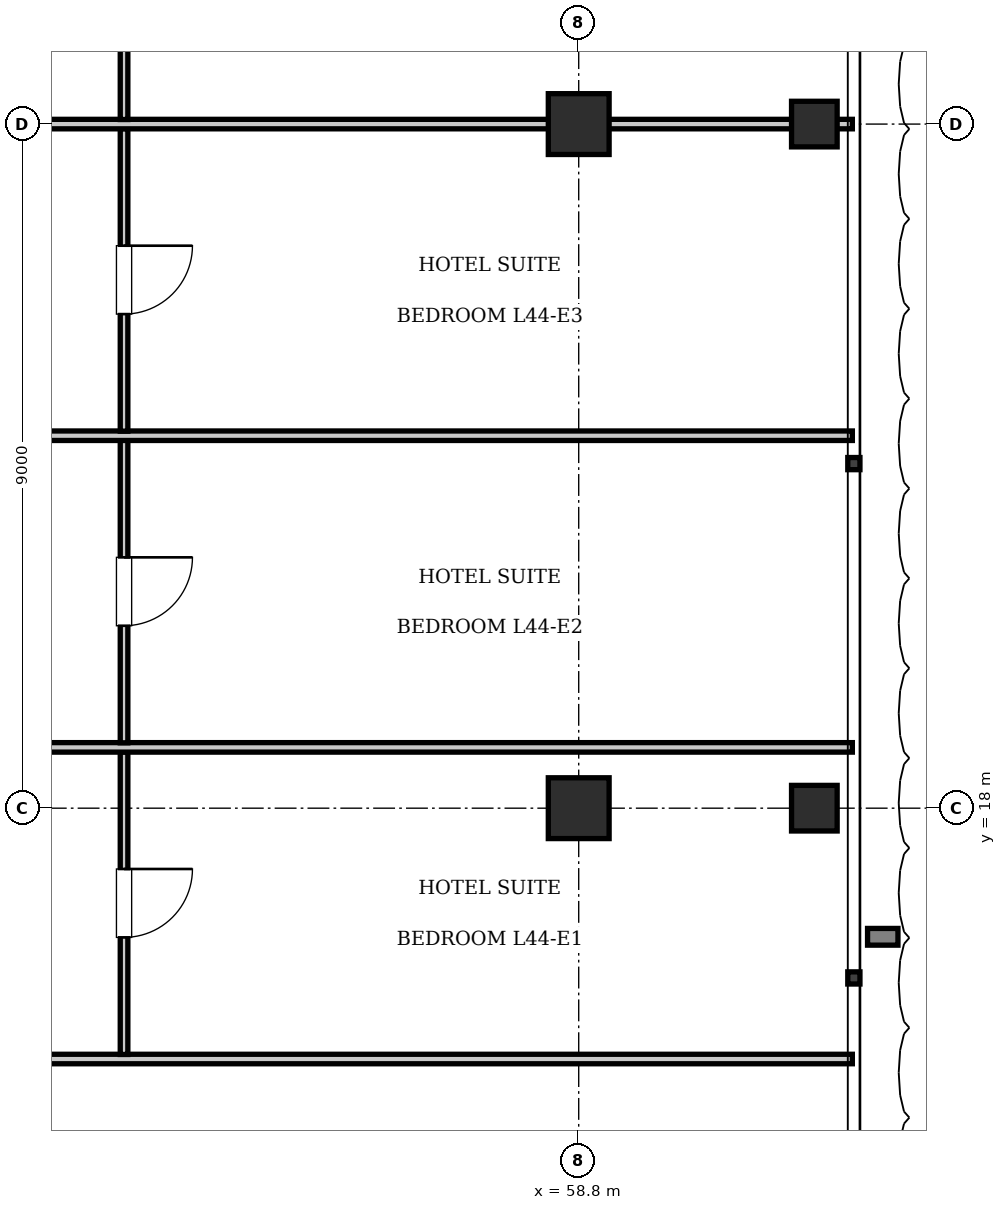
"""IFC4 building model, lengths in metres.
Left out: names, types, materials, properties, quantities, classifications, styles, units other than length and angle.
Written with IfcOpenShell. Run it as: python <this file> out.ifc"""

import sys

from ifc_helpers import new_model, si_unit, direction, frame, frame_2d, origin, origin_2d, place, context, subcontext, project, spatial, rectangle, i_section, extrude, element, fill, save


model = new_model("IFC4")
c1 = context("Model", 3, precision=1e-05, world=origin(), true_north=direction((0.0, 1.0)))
c2 = subcontext(c1, "Body", "Model", "MODEL_VIEW")
j1 = project(units=[si_unit("LENGTHUNIT", "METRE"), si_unit("PLANEANGLEUNIT", "RADIAN")], contexts=[c1])
p1 = place(None, origin())
s1 = spatial("IfcSite", under=j1, at=p1, CompositionType="ELEMENT")
p2 = place(p1, origin())
s2 = spatial("IfcBuilding", under=s1, at=p2, CompositionType="ELEMENT")
p3 = place(p2, frame((0.0, 0.0, 181.3)))
s3 = spatial("IfcBuildingStorey", under=s2, at=p3, CompositionType="ELEMENT", Elevation=181.3)
for number, where, z_axis, x_axis in (
    (1, (58.8, 18.0, 0.0), (0.0, 0.0, 1.0), (1.0, 0.0, 0.0)),
    (2, (58.8, 27.0, 0.0), (0.0, 0.0, 1.0), (1.0, 0.0, 0.0)),
):
    element("IfcColumn", number, at=place(p3, frame(where, z_axis=z_axis, x_axis=x_axis)), inside=s3, PredefinedType="COLUMN", context=c2, shape_type="SweptSolid", body=[
        extrude(rectangle(XDim=0.8, YDim=0.8, at=origin_2d()), origin(), (0.0, 0.0, 1.0), 3.85),
    ])
for number, where, z_axis, x_axis in (
    (3, (61.9, 18.0, 0.0), (0.0, 0.0, 1.0), (1.0, 0.0, 0.0)),
    (4, (61.9, 27.0, 0.0), (0.0, 0.0, 1.0), (1.0, 0.0, 0.0)),
):
    element("IfcColumn", number, at=place(p3, frame(where, z_axis=z_axis, x_axis=x_axis)), inside=s3, PredefinedType="COLUMN", context=c2, shape_type="SweptSolid", body=[
        extrude(i_section(OverallWidth=0.6, OverallDepth=0.6, WebThickness=0.025, FlangeThickness=0.038, at=origin_2d()), origin(), (0.0, 0.0, 1.0), 3.85),
    ])
p4 = place(p3, frame((39.88, 14.7, 0.0), z_axis=(0.0, 0.0, 1.0), x_axis=(1.0, 0.0, 0.0)))
e5 = element("IfcWall", 5, at=p4, inside=s3, PredefinedType="PARTITIONING", context=c2, shape_type="SweptSolid", body=[
    extrude(rectangle(XDim=22.52, YDim=0.125, at=frame_2d((11.26, 0.0))), origin(), (0.0, 0.0, 1.0), 3.61),
])
p5 = place(p3, frame((52.818, 14.76, 0.0), z_axis=(0.0, 0.0, 1.0), x_axis=(0.0, 1.0, 0.0)))
e6 = element("IfcWall", 6, at=p5, inside=s3, PredefinedType="PARTITIONING", context=c2, shape_type="SweptSolid", body=[
    extrude(rectangle(XDim=3.98, YDim=0.1, at=frame_2d((1.99, 0.0))), origin(), (0.0, 0.0, 1.0), 3.61),
])
p6 = place(p5, frame((1.54, 0.0, 0.0)))
e7 = element("IfcOpeningElement", 7, at=p6, cuts=e6, PredefinedType="OPENING", context=c2, shape_type="SweptSolid", body=[
    extrude(rectangle(XDim=0.9, YDim=2.1, at=frame_2d((0.45, 1.05))), frame((0.0, 0.06, 0.0), z_axis=(0.0, -1.0, 0.0), x_axis=(1.0, 0.0, 0.0)), (0.0, 0.0, 1.0), 0.12),
])
p7 = place(p3, frame((39.88, 18.8, 0.0), z_axis=(0.0, 0.0, 1.0), x_axis=(1.0, 0.0, 0.0)))
e8 = element("IfcWall", 8, at=p7, inside=s3, PredefinedType="PARTITIONING", context=c2, shape_type="SweptSolid", body=[
    extrude(rectangle(XDim=22.52, YDim=0.125, at=frame_2d((11.26, 0.0))), origin(), (0.0, 0.0, 1.0), 3.61),
])
p8 = place(p3, frame((52.818, 18.86, 0.0), z_axis=(0.0, 0.0, 1.0), x_axis=(0.0, 1.0, 0.0)))
e9 = element("IfcWall", 9, at=p8, inside=s3, PredefinedType="PARTITIONING", context=c2, shape_type="SweptSolid", body=[
    extrude(rectangle(XDim=3.98, YDim=0.1, at=frame_2d((1.99, 0.0))), origin(), (0.0, 0.0, 1.0), 3.61),
])
p9 = place(p8, frame((1.54, 0.0, 0.0)))
e10 = element("IfcOpeningElement", 10, at=p9, cuts=e9, PredefinedType="OPENING", context=c2, shape_type="SweptSolid", body=[
    extrude(rectangle(XDim=0.9, YDim=2.1, at=frame_2d((0.45, 1.05))), frame((0.0, 0.06, 0.0), z_axis=(0.0, -1.0, 0.0), x_axis=(1.0, 0.0, 0.0)), (0.0, 0.0, 1.0), 0.12),
])
p10 = place(p3, frame((39.88, 22.9, 0.0), z_axis=(0.0, 0.0, 1.0), x_axis=(1.0, 0.0, 0.0)))
e11 = element("IfcWall", 11, at=p10, inside=s3, PredefinedType="PARTITIONING", context=c2, shape_type="SweptSolid", body=[
    extrude(rectangle(XDim=22.52, YDim=0.125, at=frame_2d((11.26, 0.0))), origin(), (0.0, 0.0, 1.0), 3.61),
])
p11 = place(p3, frame((52.818, 22.96, 0.0), z_axis=(0.0, 0.0, 1.0), x_axis=(0.0, 1.0, 0.0)))
e12 = element("IfcWall", 12, at=p11, inside=s3, PredefinedType="PARTITIONING", context=c2, shape_type="SweptSolid", body=[
    extrude(rectangle(XDim=3.98, YDim=0.1, at=frame_2d((1.99, 0.0))), origin(), (0.0, 0.0, 1.0), 3.61),
])
p12 = place(p11, frame((1.54, 0.0, 0.0)))
e13 = element("IfcOpeningElement", 13, at=p12, cuts=e12, PredefinedType="OPENING", context=c2, shape_type="SweptSolid", body=[
    extrude(rectangle(XDim=0.9, YDim=2.1, at=frame_2d((0.45, 1.05))), frame((0.0, 0.06, 0.0), z_axis=(0.0, -1.0, 0.0), x_axis=(1.0, 0.0, 0.0)), (0.0, 0.0, 1.0), 0.12),
])
p13 = place(p3, frame((39.88, 27.0, 0.0), z_axis=(0.0, 0.0, 1.0), x_axis=(1.0, 0.0, 0.0)))
e14 = element("IfcWall", 14, at=p13, inside=s3, PredefinedType="PARTITIONING", context=c2, shape_type="SweptSolid", body=[
    extrude(rectangle(XDim=22.52, YDim=0.125, at=frame_2d((11.26, 0.0))), origin(), (0.0, 0.0, 1.0), 2.41),
])
p14 = place(p3, frame((52.818, 27.06, 0.0), z_axis=(0.0, 0.0, 1.0), x_axis=(0.0, 1.0, 0.0)))
e15 = element("IfcWall", 15, at=p14, inside=s3, PredefinedType="PARTITIONING", context=c2, shape_type="SweptSolid", body=[
    extrude(rectangle(XDim=3.98, YDim=0.1, at=frame_2d((1.99, 0.0))), origin(), (0.0, 0.0, 1.0), 3.61),
])
p15 = place(p14, frame((1.54, 0.0, 0.0)))
e16 = element("IfcOpeningElement", 16, at=p15, cuts=e15, PredefinedType="OPENING", context=c2, shape_type="SweptSolid", body=[
    extrude(rectangle(XDim=0.9, YDim=2.1, at=frame_2d((0.45, 1.05))), frame((0.0, 0.06, 0.0), z_axis=(0.0, -1.0, 0.0), x_axis=(1.0, 0.0, 0.0)), (0.0, 0.0, 1.0), 0.12),
])
p16 = place(p6, frame((0.9, 0.0, 0.0), z_axis=(0.0, 0.0, 1.0), x_axis=(-1.0, 0.0, 0.0)))
e17 = element("IfcDoor", 17, at=p16, inside=s3, OperationType="SINGLE_SWING_LEFT", PredefinedType="DOOR", context=c2, shape_type="SweptSolid", body=[
    extrude(rectangle(XDim=0.9, YDim=2.1, at=frame_2d((0.45, 1.05))), frame((0.0, 0.025, 0.0), z_axis=(0.0, -1.0, 0.0), x_axis=(1.0, 0.0, 0.0)), (0.0, 0.0, 1.0), 0.05),
])
fill(e7, e17)
p17 = place(p9, frame((0.9, 0.0, 0.0), z_axis=(0.0, 0.0, 1.0), x_axis=(-1.0, 0.0, 0.0)))
e18 = element("IfcDoor", 18, at=p17, inside=s3, OperationType="SINGLE_SWING_LEFT", PredefinedType="DOOR", context=c2, shape_type="SweptSolid", body=[
    extrude(rectangle(XDim=0.9, YDim=2.1, at=frame_2d((0.45, 1.05))), frame((0.0, 0.025, 0.0), z_axis=(0.0, -1.0, 0.0), x_axis=(1.0, 0.0, 0.0)), (0.0, 0.0, 1.0), 0.05),
])
fill(e10, e18)
p18 = place(p12, frame((0.9, 0.0, 0.0), z_axis=(0.0, 0.0, 1.0), x_axis=(-1.0, 0.0, 0.0)))
e19 = element("IfcDoor", 19, at=p18, inside=s3, OperationType="SINGLE_SWING_LEFT", PredefinedType="DOOR", context=c2, shape_type="SweptSolid", body=[
    extrude(rectangle(XDim=0.9, YDim=2.1, at=frame_2d((0.45, 1.05))), frame((0.0, 0.025, 0.0), z_axis=(0.0, -1.0, 0.0), x_axis=(1.0, 0.0, 0.0)), (0.0, 0.0, 1.0), 0.05),
])
fill(e13, e19)
save(model, sys.argv[1])
